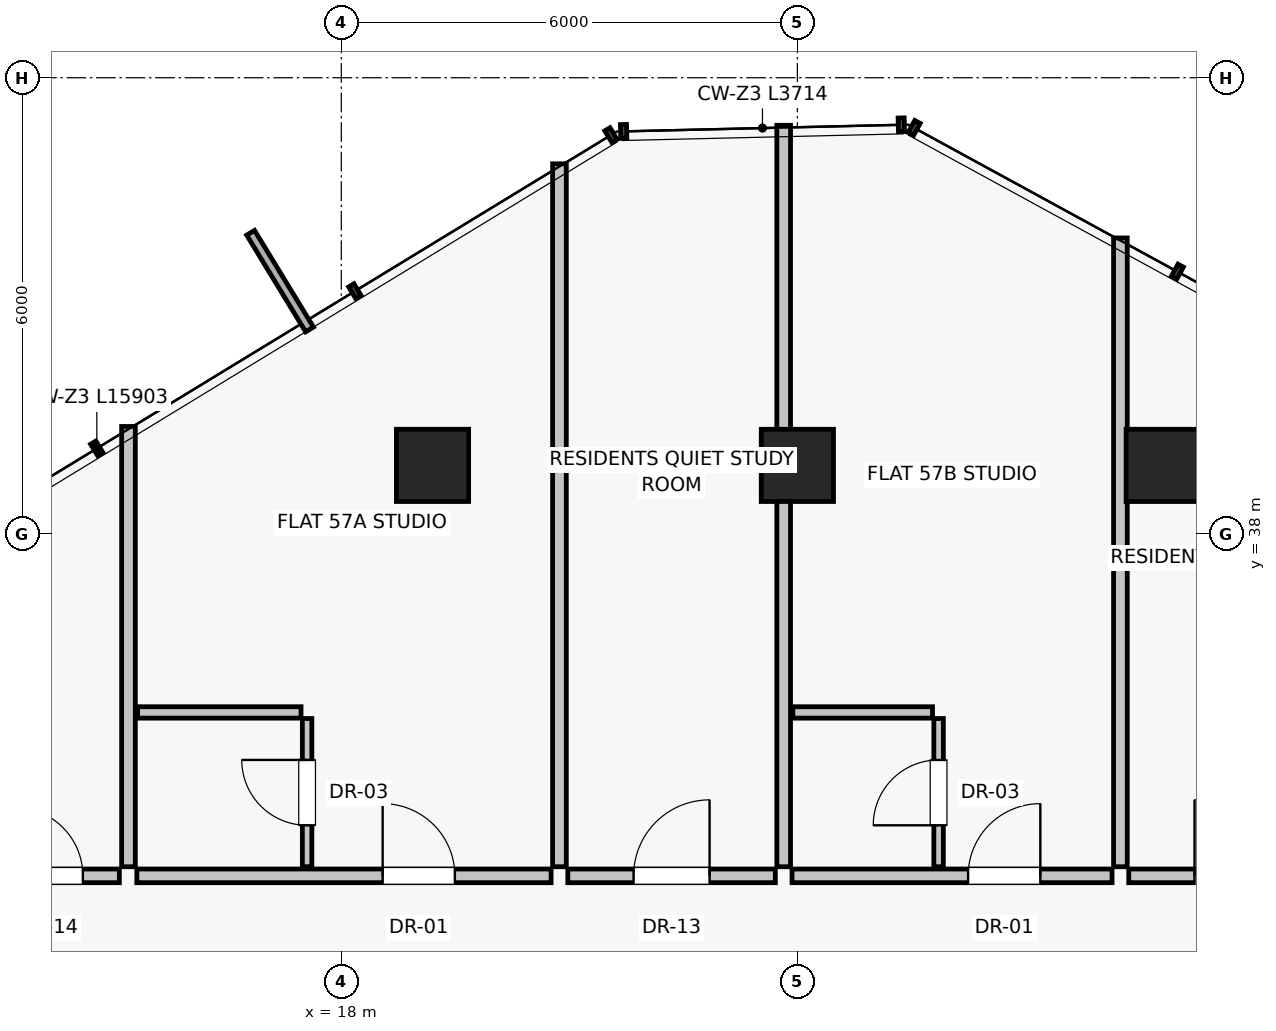
"""IFC4 building model, lengths in metres.
Left out: names, types, materials, properties, quantities, classifications, styles, units other than length and angle.
Written with IfcOpenShell. Run it as: python <this file> out.ifc"""

import sys

from ifc_helpers import new_model, si_unit, direction, frame, frame_2d, origin, origin_2d, place, context, subcontext, project, spatial, rectangle, extrude, source, transform, mapped, element, fill, save


model = new_model("IFC4")
c1 = context("Model", 3, precision=1e-05, world=origin(), true_north=direction((0.0, 1.0)))
c2 = subcontext(c1, "Body", "Model", "MODEL_VIEW")
j1 = project(units=[si_unit("LENGTHUNIT", "METRE"), si_unit("PLANEANGLEUNIT", "RADIAN")], contexts=[c1])
p1 = place(None, origin())
s1 = spatial("IfcSite", under=j1, at=p1, CompositionType="ELEMENT")
p2 = place(p1, origin())
s2 = spatial("IfcBuilding", under=s1, at=p2, CompositionType="ELEMENT")
p3 = place(p2, frame((0.0, 0.0, 201.6)))
s3 = spatial("IfcBuildingStorey", under=s2, at=p3, CompositionType="ELEMENT", Elevation=201.6)
for number, where, z_axis, x_axis in (
    (1, (28.8, 38.9, 0.0), (0.0, 0.0, 1.0), (1.0, 0.0, 0.0)),
    (2, (24.0, 38.9, 0.0), (0.0, 0.0, 1.0), (1.0, 0.0, 0.0)),
    (3, (19.2, 38.9, 0.0), (0.0, 0.0, 1.0), (1.0, 0.0, 0.0)),
):
    element("IfcColumn", number, at=place(p3, frame(where, z_axis=z_axis, x_axis=x_axis)), inside=s3, PredefinedType="COLUMN", context=c2, shape_type="SweptSolid", body=[
        extrude(rectangle(XDim=0.95, YDim=0.95, at=origin_2d()), origin(), (0.0, 0.0, 1.0), 3.25),
    ])
p4 = place(p3, frame((15.2, 33.62, 0.0), z_axis=(0.0, 0.0, 1.0), x_axis=(0.0, 1.0, 0.0)))
e4 = element("IfcWall", 4, at=p4, inside=s3, PredefinedType="PARTITIONING", context=c2, shape_type="SweptSolid", body=[
    extrude(rectangle(XDim=5.792, YDim=0.18, at=frame_2d((2.896, 0.0))), origin(), (0.0, 0.0, 1.0), 3.015),
])
p5 = place(p3, frame((20.98, 33.5, 0.0), z_axis=(0.0, 0.0, 1.0), x_axis=(1.0, 0.0, 0.0)))
e5 = element("IfcWall", 5, at=p5, inside=s3, PredefinedType="PARTITIONING", context=c2, shape_type="SweptSolid", body=[
    extrude(rectangle(XDim=2.73, YDim=0.18, at=frame_2d((1.365, 0.0))), origin(), (0.0, 0.0, 1.0), 3.015),
])
p6 = place(p5, frame((0.865, 0.0, 0.0)))
e6 = element("IfcOpeningElement", 6, at=p6, cuts=e5, PredefinedType="OPENING", context=c2, shape_type="SweptSolid", body=[
    extrude(rectangle(XDim=1.0, YDim=2.01, at=frame_2d((0.5, 1.005))), frame((0.0, 0.1, 0.0), z_axis=(0.0, -1.0, 0.0), x_axis=(1.0, 0.0, 0.0)), (0.0, 0.0, 1.0), 0.2),
])
p7 = place(p3, frame((20.87, 33.62, 0.0), z_axis=(0.0, 0.0, 1.0), x_axis=(0.0, 1.0, 0.0)))
e7 = element("IfcWall", 7, at=p7, inside=s3, PredefinedType="PARTITIONING", context=c2, shape_type="SweptSolid", body=[
    extrude(rectangle(XDim=9.248, YDim=0.18, at=frame_2d((4.624, 0.0))), origin(), (0.0, 0.0, 1.0), 3.015),
])
p8 = place(p3, frame((15.31, 33.5, 0.0), z_axis=(0.0, 0.0, 1.0), x_axis=(1.0, 0.0, 0.0)))
e8 = element("IfcWall", 8, at=p8, inside=s3, PredefinedType="PARTITIONING", context=c2, shape_type="SweptSolid", body=[
    extrude(rectangle(XDim=5.45, YDim=0.18, at=frame_2d((2.725, 0.0))), origin(), (0.0, 0.0, 1.0), 3.015),
])
p9 = place(p8, frame((3.234, 0.0, 0.0)))
e9 = element("IfcOpeningElement", 9, at=p9, cuts=e8, PredefinedType="OPENING", context=c2, shape_type="SweptSolid", body=[
    extrude(rectangle(XDim=0.95, YDim=2.02, at=frame_2d((0.475, 1.01))), frame((0.0, 0.1, 0.0), z_axis=(0.0, -1.0, 0.0), x_axis=(1.0, 0.0, 0.0)), (0.0, 0.0, 1.0), 0.2),
])
p10 = place(p3, frame((17.55, 33.62, 0.0), z_axis=(0.0, 0.0, 1.0), x_axis=(0.0, 1.0, 0.0)))
e10 = element("IfcWall", 10, at=p10, inside=s3, PredefinedType="PARTITIONING", context=c2, shape_type="SweptSolid", body=[
    extrude(rectangle(XDim=1.95, YDim=0.125, at=frame_2d((0.975, 0.0))), origin(), (0.0, 0.0, 1.0), 3.015),
])
p11 = place(p10, frame((0.545, 0.0, 0.0)))
e11 = element("IfcOpeningElement", 11, at=p11, cuts=e10, PredefinedType="OPENING", context=c2, shape_type="SweptSolid", body=[
    extrude(rectangle(XDim=0.86, YDim=2.01, at=frame_2d((0.43, 1.005))), frame((0.0, 0.073, 0.0), z_axis=(0.0, -1.0, 0.0), x_axis=(1.0, 0.0, 0.0)), (0.0, 0.0, 1.0), 0.145),
])
p12 = place(p3, frame((15.32, 35.65, 0.0), z_axis=(0.0, 0.0, 1.0), x_axis=(1.0, 0.0, 0.0)))
e12 = element("IfcWall", 12, at=p12, inside=s3, PredefinedType="PARTITIONING", context=c2, shape_type="SweptSolid", body=[
    extrude(rectangle(XDim=2.15, YDim=0.15, at=frame_2d((1.075, 0.0))), origin(), (0.0, 0.0, 1.0), 3.015),
])
p13 = place(p3, frame((23.82, 33.62, 0.0), z_axis=(0.0, 0.0, 1.0), x_axis=(0.0, 1.0, 0.0)))
e13 = element("IfcWall", 13, at=p13, inside=s3, PredefinedType="PARTITIONING", context=c2, shape_type="SweptSolid", body=[
    extrude(rectangle(XDim=9.754, YDim=0.18, at=frame_2d((4.877, 0.0))), origin(), (0.0, 0.0, 1.0), 3.015),
])
p14 = place(p3, frame((28.36, 33.5, 0.0), z_axis=(0.0, 0.0, 1.0), x_axis=(1.0, 0.0, 0.0)))
e14 = element("IfcWall", 14, at=p14, inside=s3, PredefinedType="PARTITIONING", context=c2, shape_type="SweptSolid", body=[
    extrude(rectangle(XDim=2.73, YDim=0.18, at=frame_2d((1.365, 0.0))), origin(), (0.0, 0.0, 1.0), 3.015),
])
p15 = place(p14, frame((0.865, 0.0, 0.0)))
e15 = element("IfcOpeningElement", 15, at=p15, cuts=e14, PredefinedType="OPENING", context=c2, shape_type="SweptSolid", body=[
    extrude(rectangle(XDim=1.0, YDim=2.01, at=frame_2d((0.5, 1.005))), frame((0.0, 0.1, 0.0), z_axis=(0.0, -1.0, 0.0), x_axis=(1.0, 0.0, 0.0)), (0.0, 0.0, 1.0), 0.2),
])
p16 = place(p3, frame((28.25, 33.62, 0.0), z_axis=(0.0, 0.0, 1.0), x_axis=(0.0, 1.0, 0.0)))
e16 = element("IfcWall", 16, at=p16, inside=s3, PredefinedType="PARTITIONING", context=c2, shape_type="SweptSolid", body=[
    extrude(rectangle(XDim=8.272, YDim=0.18, at=frame_2d((4.136, 0.0))), origin(), (0.0, 0.0, 1.0), 2.469),
])
p17 = place(p3, frame((23.93, 33.5, 0.0), z_axis=(0.0, 0.0, 1.0), x_axis=(1.0, 0.0, 0.0)))
e17 = element("IfcWall", 17, at=p17, inside=s3, PredefinedType="PARTITIONING", context=c2, shape_type="SweptSolid", body=[
    extrude(rectangle(XDim=4.21, YDim=0.18, at=frame_2d((2.105, 0.0))), origin(), (0.0, 0.0, 1.0), 3.015),
])
p18 = place(p17, frame((2.316, 0.0, 0.0)))
e18 = element("IfcOpeningElement", 18, at=p18, cuts=e17, PredefinedType="OPENING", context=c2, shape_type="SweptSolid", body=[
    extrude(rectangle(XDim=0.95, YDim=2.02, at=frame_2d((0.475, 1.01))), frame((0.0, 0.1, 0.0), z_axis=(0.0, -1.0, 0.0), x_axis=(1.0, 0.0, 0.0)), (0.0, 0.0, 1.0), 0.2),
])
p19 = place(p3, frame((25.858, 33.62, 0.0), z_axis=(0.0, 0.0, 1.0), x_axis=(0.0, 1.0, 0.0)))
e19 = element("IfcWall", 19, at=p19, inside=s3, PredefinedType="PARTITIONING", context=c2, shape_type="SweptSolid", body=[
    extrude(rectangle(XDim=1.95, YDim=0.125, at=frame_2d((0.975, 0.0))), origin(), (0.0, 0.0, 1.0), 3.015),
])
p20 = place(p19, frame((0.545, 0.0, 0.0)))
e20 = element("IfcOpeningElement", 20, at=p20, cuts=e19, PredefinedType="OPENING", context=c2, shape_type="SweptSolid", body=[
    extrude(rectangle(XDim=0.86, YDim=2.01, at=frame_2d((0.43, 1.005))), frame((0.0, 0.073, 0.0), z_axis=(0.0, -1.0, 0.0), x_axis=(1.0, 0.0, 0.0)), (0.0, 0.0, 1.0), 0.145),
])
p21 = place(p3, frame((23.94, 35.65, 0.0), z_axis=(0.0, 0.0, 1.0), x_axis=(1.0, 0.0, 0.0)))
e21 = element("IfcWall", 21, at=p21, inside=s3, PredefinedType="PARTITIONING", context=c2, shape_type="SweptSolid", body=[
    extrude(rectangle(XDim=1.838, YDim=0.15, at=frame_2d((0.919, 0.0))), origin(), (0.0, 0.0, 1.0), 2.662),
])
p22 = place(p3, frame((13.22, 33.5, 0.0), z_axis=(0.0, 0.0, 1.0), x_axis=(1.0, 0.0, 0.0)))
e22 = element("IfcWall", 22, at=p22, inside=s3, PredefinedType="PARTITIONING", context=c2, shape_type="SweptSolid", body=[
    extrude(rectangle(XDim=1.86, YDim=0.18, at=frame_2d((0.93, 0.0))), origin(), (0.0, 0.0, 1.0), 3.015),
])
p23 = place(p22, frame((0.48, 0.0, 0.0)))
e23 = element("IfcOpeningElement", 23, at=p23, cuts=e22, PredefinedType="OPENING", context=c2, shape_type="SweptSolid", body=[
    extrude(rectangle(XDim=0.9, YDim=2.01, at=frame_2d((0.45, 1.005))), frame((0.0, 0.1, 0.0), z_axis=(0.0, -1.0, 0.0), x_axis=(1.0, 0.0, 0.0)), (0.0, 0.0, 1.0), 0.2),
])
m1 = source(origin(), c2, "Body", "SweptSolid", [
    extrude(rectangle(XDim=1.0, YDim=2.01, at=frame_2d((0.5, 1.005))), frame((0.0, 0.025, 0.0), z_axis=(0.0, -1.0, 0.0), x_axis=(1.0, 0.0, 0.0)), (0.0, 0.0, 1.0), 0.05),
])
p24 = place(p6, origin())
e24 = element("IfcDoor", 24, at=p24, inside=s3, OperationType="SINGLE_SWING_RIGHT", PredefinedType="DOOR", context=c2, shape_type="MappedRepresentation", body=[
    mapped(m1, transform((0.0, 0.0, 0.0), scale=1.0)),
])
fill(e6, e24)
m2 = source(origin(), c2, "Body", "SweptSolid", [
    extrude(rectangle(XDim=0.95, YDim=2.02, at=frame_2d((0.475, 1.01))), frame((0.0, 0.025, 0.0), z_axis=(0.0, -1.0, 0.0), x_axis=(1.0, 0.0, 0.0)), (0.0, 0.0, 1.0), 0.05),
])
p25 = place(p9, origin())
e25 = element("IfcDoor", 25, at=p25, inside=s3, OperationType="SINGLE_SWING_LEFT", PredefinedType="DOOR", context=c2, shape_type="MappedRepresentation", body=[
    mapped(m2, transform((0.0, 0.0, 0.0), scale=1.0)),
])
fill(e9, e25)
m3 = source(origin(), c2, "Body", "SweptSolid", [
    extrude(rectangle(XDim=0.86, YDim=2.01, at=frame_2d((0.43, 1.005))), frame((0.0, 0.025, 0.0), z_axis=(0.0, -1.0, 0.0), x_axis=(1.0, 0.0, 0.0)), (0.0, 0.0, 1.0), 0.05),
])
p26 = place(p11, origin())
e26 = element("IfcDoor", 26, at=p26, inside=s3, OperationType="SINGLE_SWING_RIGHT", PredefinedType="DOOR", context=c2, shape_type="MappedRepresentation", body=[
    mapped(m3, transform((0.0, 0.0, 0.0), scale=1.0)),
])
fill(e11, e26)
p27 = place(p15, origin())
e27 = element("IfcDoor", 27, at=p27, inside=s3, OperationType="SINGLE_SWING_LEFT", PredefinedType="DOOR", context=c2, shape_type="MappedRepresentation", body=[
    mapped(m1, transform((0.0, 0.0, 0.0), scale=1.0)),
])
fill(e15, e27)
p28 = place(p18, origin())
e28 = element("IfcDoor", 28, at=p28, inside=s3, OperationType="SINGLE_SWING_RIGHT", PredefinedType="DOOR", context=c2, shape_type="MappedRepresentation", body=[
    mapped(m2, transform((0.0, 0.0, 0.0), scale=1.0)),
])
fill(e18, e28)
p29 = place(p20, origin())
e29 = element("IfcDoor", 29, at=p29, inside=s3, OperationType="SINGLE_SWING_LEFT", PredefinedType="DOOR", context=c2, shape_type="MappedRepresentation", body=[
    mapped(m3, transform((0.0, 0.0, 0.0), scale=1.0)),
])
fill(e20, e29)
m4 = source(origin(), c2, "Body", "SweptSolid", [
    extrude(rectangle(XDim=0.9, YDim=2.01, at=frame_2d((0.45, 1.005))), frame((0.0, 0.025, 0.0), z_axis=(0.0, -1.0, 0.0), x_axis=(1.0, 0.0, 0.0)), (0.0, 0.0, 1.0), 0.05),
])
p30 = place(p23, origin())
e30 = element("IfcDoor", 30, at=p30, inside=s3, OperationType="SINGLE_SWING_LEFT", PredefinedType="DOOR", context=c2, shape_type="MappedRepresentation", body=[
    mapped(m4, transform((0.0, 0.0, 0.0), scale=1.0)),
])
fill(e23, e30)
save(model, sys.argv[1])
